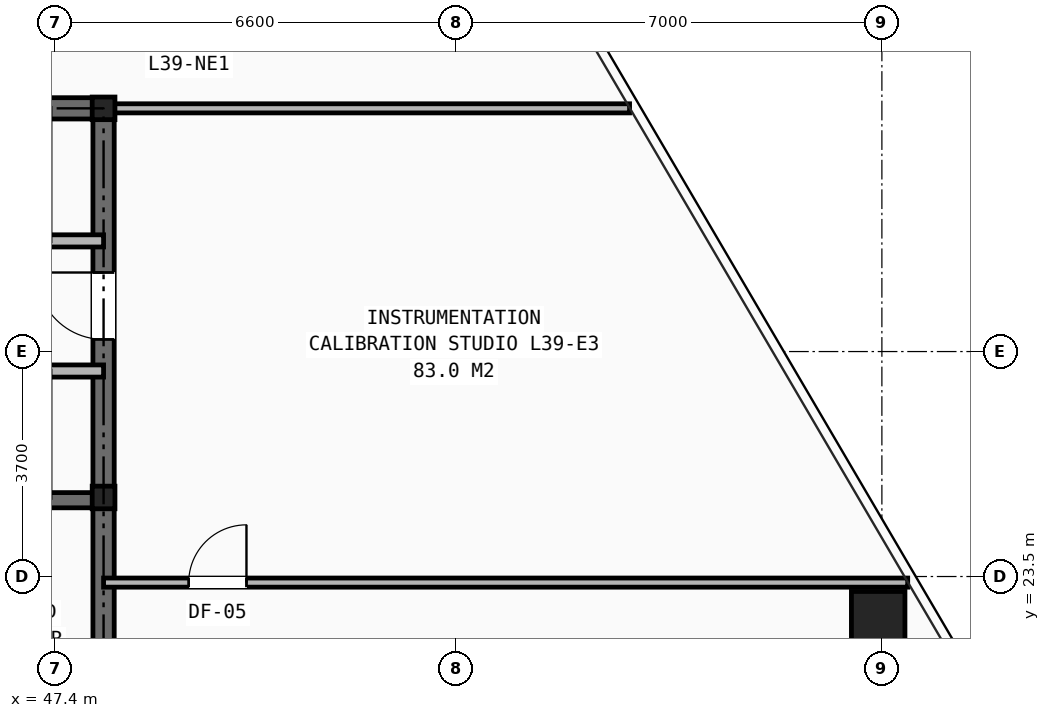
"""IFC4 building model, lengths in metres.
Left out: names, types, materials, properties, quantities, classifications, styles, units other than length and angle.
Written with IfcOpenShell. Run it as: python <this file> out.ifc"""

import sys

from ifc_helpers import new_model, si_unit, direction, frame, frame_2d, origin, origin_2d, place, context, subcontext, project, spatial, rectangle, hollow_rectangle, i_section, extrude, element, fill, save


model = new_model("IFC4")
c1 = context("Model", 3, precision=1e-05, world=origin(), true_north=direction((0.0, 1.0)))
c2 = subcontext(c1, "Body", "Model", "MODEL_VIEW")
j1 = project(units=[si_unit("LENGTHUNIT", "METRE"), si_unit("PLANEANGLEUNIT", "RADIAN")], contexts=[c1])
p1 = place(None, origin())
s1 = spatial("IfcSite", under=j1, at=p1, CompositionType="ELEMENT")
p2 = place(p1, origin())
s2 = spatial("IfcBuilding", under=s1, at=p2, CompositionType="ELEMENT")
p3 = place(p2, frame((0.0, 0.0, 136.7)))
s3 = spatial("IfcBuildingStorey", under=s2, at=p3, CompositionType="ELEMENT", Elevation=136.7)
for number, where, z_axis, x_axis in (
    (1, (48.2, 24.8, 0.0), (0.0, 0.0, 1.0), (1.0, 0.0, 0.0)),
    (2, (48.2, 31.2, 0.0), (0.0, 0.0, 1.0), (1.0, 0.0, 0.0)),
):
    element("IfcColumn", number, at=place(p3, frame(where, z_axis=z_axis, x_axis=x_axis)), inside=s3, PredefinedType="COLUMN", context=c2, shape_type="SweptSolid", body=[
        extrude(i_section(OverallWidth=0.374, OverallDepth=0.372, WebThickness=0.016, FlangeThickness=0.026, at=origin_2d()), origin(), (0.0, 0.0, 1.0), 3.45),
    ])
p4 = place(p3, frame((60.939, 22.814, 0.0), z_axis=(0.0, 0.0, 1.0), x_axis=(1.0, 0.0, 0.0)))
e3 = element("IfcColumn", 3, at=p4, inside=s3, PredefinedType="COLUMN", context=c2, shape_type="SweptSolid", body=[
    extrude(hollow_rectangle(XDim=0.88, YDim=0.88, WallThickness=0.06, at=origin_2d()), origin(), (0.0, 0.0, 1.0), 3.45),
])
p5 = place(p3, frame((31.8, 31.2, 0.0), z_axis=(0.0, 0.0, 1.0), x_axis=(1.0, 0.0, 0.0)))
e4 = element("IfcWall", 4, at=p5, inside=s3, PredefinedType="SHEAR", context=c2, shape_type="SweptSolid", body=[
    extrude(rectangle(XDim=16.4, YDim=0.35, at=frame_2d((8.2, 0.0))), origin(), (0.0, 0.0, 1.0), 3.21),
])
p6 = place(p3, frame((48.2, 16.4, 0.0), z_axis=(0.0, 0.0, 1.0), x_axis=(0.0, 1.0, 0.0)))
e5 = element("IfcWall", 5, at=p6, inside=s3, PredefinedType="SHEAR", context=c2, shape_type="SweptSolid", body=[
    extrude(rectangle(XDim=14.8, YDim=0.35, at=frame_2d((7.4, 0.0))), origin(), (0.0, 0.0, 1.0), 3.21),
])
p7 = place(p6, frame((11.0, 0.0, 0.0)))
e6 = element("IfcOpeningElement", 6, at=p7, cuts=e5, PredefinedType="OPENING", context=c2, shape_type="SweptSolid", body=[
    extrude(rectangle(XDim=1.1, YDim=2.15, at=frame_2d((0.55, 1.075))), frame((0.0, 0.185, 0.0), z_axis=(0.0, -1.0, 0.0), x_axis=(1.0, 0.0, 0.0)), (0.0, 0.0, 1.0), 0.37),
])
p8 = place(p3, frame((44.955, 24.755, 0.0), z_axis=(0.0, 0.0, 1.0), x_axis=(1.0, 0.0, 0.0)))
e7 = element("IfcWall", 7, at=p8, inside=s3, PredefinedType="SHEAR", context=c2, shape_type="SweptSolid", body=[
    extrude(rectangle(XDim=3.245, YDim=0.25, at=frame_2d((1.623, 0.0))), origin(), (0.0, 0.0, 1.0), 3.21),
])
p9 = place(p3, frame((31.8, 29.02, 0.0), z_axis=(0.0, 0.0, 1.0), x_axis=(1.0, 0.0, 0.0)))
e8 = element("IfcWall", 8, at=p9, inside=s3, PredefinedType="SOLIDWALL", context=c2, shape_type="SweptSolid", body=[
    extrude(rectangle(XDim=16.4, YDim=0.2, at=frame_2d((8.2, 0.0))), origin(), (0.0, 0.0, 1.0), 2.661),
])
p10 = place(p9, frame((0.55, 0.0, 0.0)))
e9 = element("IfcOpeningElement", 9, at=p10, cuts=e8, PredefinedType="OPENING", context=c2, shape_type="SweptSolid", body=[
    extrude(rectangle(XDim=0.85, YDim=2.05, at=frame_2d((0.425, 1.025))), frame((0.0, 0.11, 0.0), z_axis=(0.0, -1.0, 0.0), x_axis=(1.0, 0.0, 0.0)), (0.0, 0.0, 1.0), 0.22),
])
p11 = place(p9, frame((5.94, 0.0, 0.0)))
e10 = element("IfcOpeningElement", 10, at=p11, cuts=e8, PredefinedType="OPENING", context=c2, shape_type="SweptSolid", body=[
    extrude(rectangle(XDim=0.9, YDim=2.1, at=frame_2d((0.45, 1.05))), frame((0.0, 0.11, 0.0), z_axis=(0.0, -1.0, 0.0), x_axis=(1.0, 0.0, 0.0)), (0.0, 0.0, 1.0), 0.22),
])
p12 = place(p3, frame((33.82, 26.88, 0.0), z_axis=(0.0, 0.0, 1.0), x_axis=(1.0, 0.0, 0.0)))
e11 = element("IfcWall", 11, at=p12, inside=s3, PredefinedType="SOLIDWALL", context=c2, shape_type="SweptSolid", body=[
    extrude(rectangle(XDim=14.38, YDim=0.2, at=frame_2d((7.19, 0.0))), origin(), (0.0, 0.0, 1.0), 2.661),
])
p13 = place(p12, frame((0.53, 0.0, 0.0)))
e12 = element("IfcOpeningElement", 12, at=p13, cuts=e11, PredefinedType="OPENING", context=c2, shape_type="SweptSolid", body=[
    extrude(rectangle(XDim=1.1, YDim=2.15, at=frame_2d((0.55, 1.075))), frame((0.0, 0.11, 0.0), z_axis=(0.0, -1.0, 0.0), x_axis=(1.0, 0.0, 0.0)), (0.0, 0.0, 1.0), 0.22),
])
p14 = place(p12, frame((2.69, 0.0, 0.0)))
e13 = element("IfcOpeningElement", 13, at=p14, cuts=e11, PredefinedType="OPENING", context=c2, shape_type="SweptSolid", body=[
    extrude(rectangle(XDim=1.1, YDim=2.15, at=frame_2d((0.55, 1.075))), frame((0.0, 0.11, 0.0), z_axis=(0.0, -1.0, 0.0), x_axis=(1.0, 0.0, 0.0)), (0.0, 0.0, 1.0), 0.22),
])
p15 = place(p12, frame((4.85, 0.0, 0.0)))
e14 = element("IfcOpeningElement", 14, at=p15, cuts=e11, PredefinedType="OPENING", context=c2, shape_type="SweptSolid", body=[
    extrude(rectangle(XDim=1.1, YDim=2.15, at=frame_2d((0.55, 1.075))), frame((0.0, 0.11, 0.0), z_axis=(0.0, -1.0, 0.0), x_axis=(1.0, 0.0, 0.0)), (0.0, 0.0, 1.0), 0.22),
])
p16 = place(p12, frame((7.01, 0.0, 0.0)))
e15 = element("IfcOpeningElement", 15, at=p16, cuts=e11, PredefinedType="OPENING", context=c2, shape_type="SweptSolid", body=[
    extrude(rectangle(XDim=1.1, YDim=2.15, at=frame_2d((0.55, 1.075))), frame((0.0, 0.11, 0.0), z_axis=(0.0, -1.0, 0.0), x_axis=(1.0, 0.0, 0.0)), (0.0, 0.0, 1.0), 0.22),
])
p17 = place(p3, frame((48.2, 31.2, 0.0), z_axis=(0.0, 0.0, 1.0), x_axis=(1.0, 0.0, 0.0)))
e16 = element("IfcWall", 16, at=p17, inside=s3, PredefinedType="PARTITIONING", context=c2, shape_type="SweptSolid", body=[
    extrude(rectangle(XDim=8.65, YDim=0.15, at=frame_2d((4.325, 0.0))), origin(), (0.0, 0.0, 1.0), 2.225),
])
p18 = place(p3, frame((48.2, 23.4, 0.0), z_axis=(0.0, 0.0, 1.0), x_axis=(1.0, 0.0, 0.0)))
e17 = element("IfcWall", 17, at=p18, inside=s3, PredefinedType="PARTITIONING", context=c2, shape_type="SweptSolid", body=[
    extrude(rectangle(XDim=13.225, YDim=0.15, at=frame_2d((6.612, 0.0))), origin(), (0.0, 0.0, 1.0), 2.589),
])
p19 = place(p18, frame((1.4, 0.0, 0.0)))
e18 = element("IfcOpeningElement", 18, at=p19, cuts=e17, PredefinedType="OPENING", context=c2, shape_type="SweptSolid", body=[
    extrude(rectangle(XDim=0.95, YDim=2.1, at=frame_2d((0.475, 1.05))), frame((0.0, 0.085, 0.0), z_axis=(0.0, -1.0, 0.0), x_axis=(1.0, 0.0, 0.0)), (0.0, 0.0, 1.0), 0.17),
])
p20 = place(p7, origin())
e19 = element("IfcDoor", 19, at=p20, inside=s3, OperationType="SINGLE_SWING_RIGHT", PredefinedType="DOOR", context=c2, shape_type="SweptSolid", body=[
    extrude(rectangle(XDim=1.1, YDim=2.15, at=frame_2d((0.55, 1.075))), frame((0.0, 0.025, 0.0), z_axis=(0.0, -1.0, 0.0), x_axis=(1.0, 0.0, 0.0)), (0.0, 0.0, 1.0), 0.05),
])
fill(e6, e19)
p21 = place(p19, origin())
e20 = element("IfcDoor", 20, at=p21, inside=s3, OperationType="SINGLE_SWING_RIGHT", PredefinedType="DOOR", context=c2, shape_type="SweptSolid", body=[
    extrude(rectangle(XDim=0.95, YDim=2.1, at=frame_2d((0.475, 1.05))), frame((0.0, 0.025, 0.0), z_axis=(0.0, -1.0, 0.0), x_axis=(1.0, 0.0, 0.0)), (0.0, 0.0, 1.0), 0.05),
])
fill(e18, e20)
save(model, sys.argv[1])
